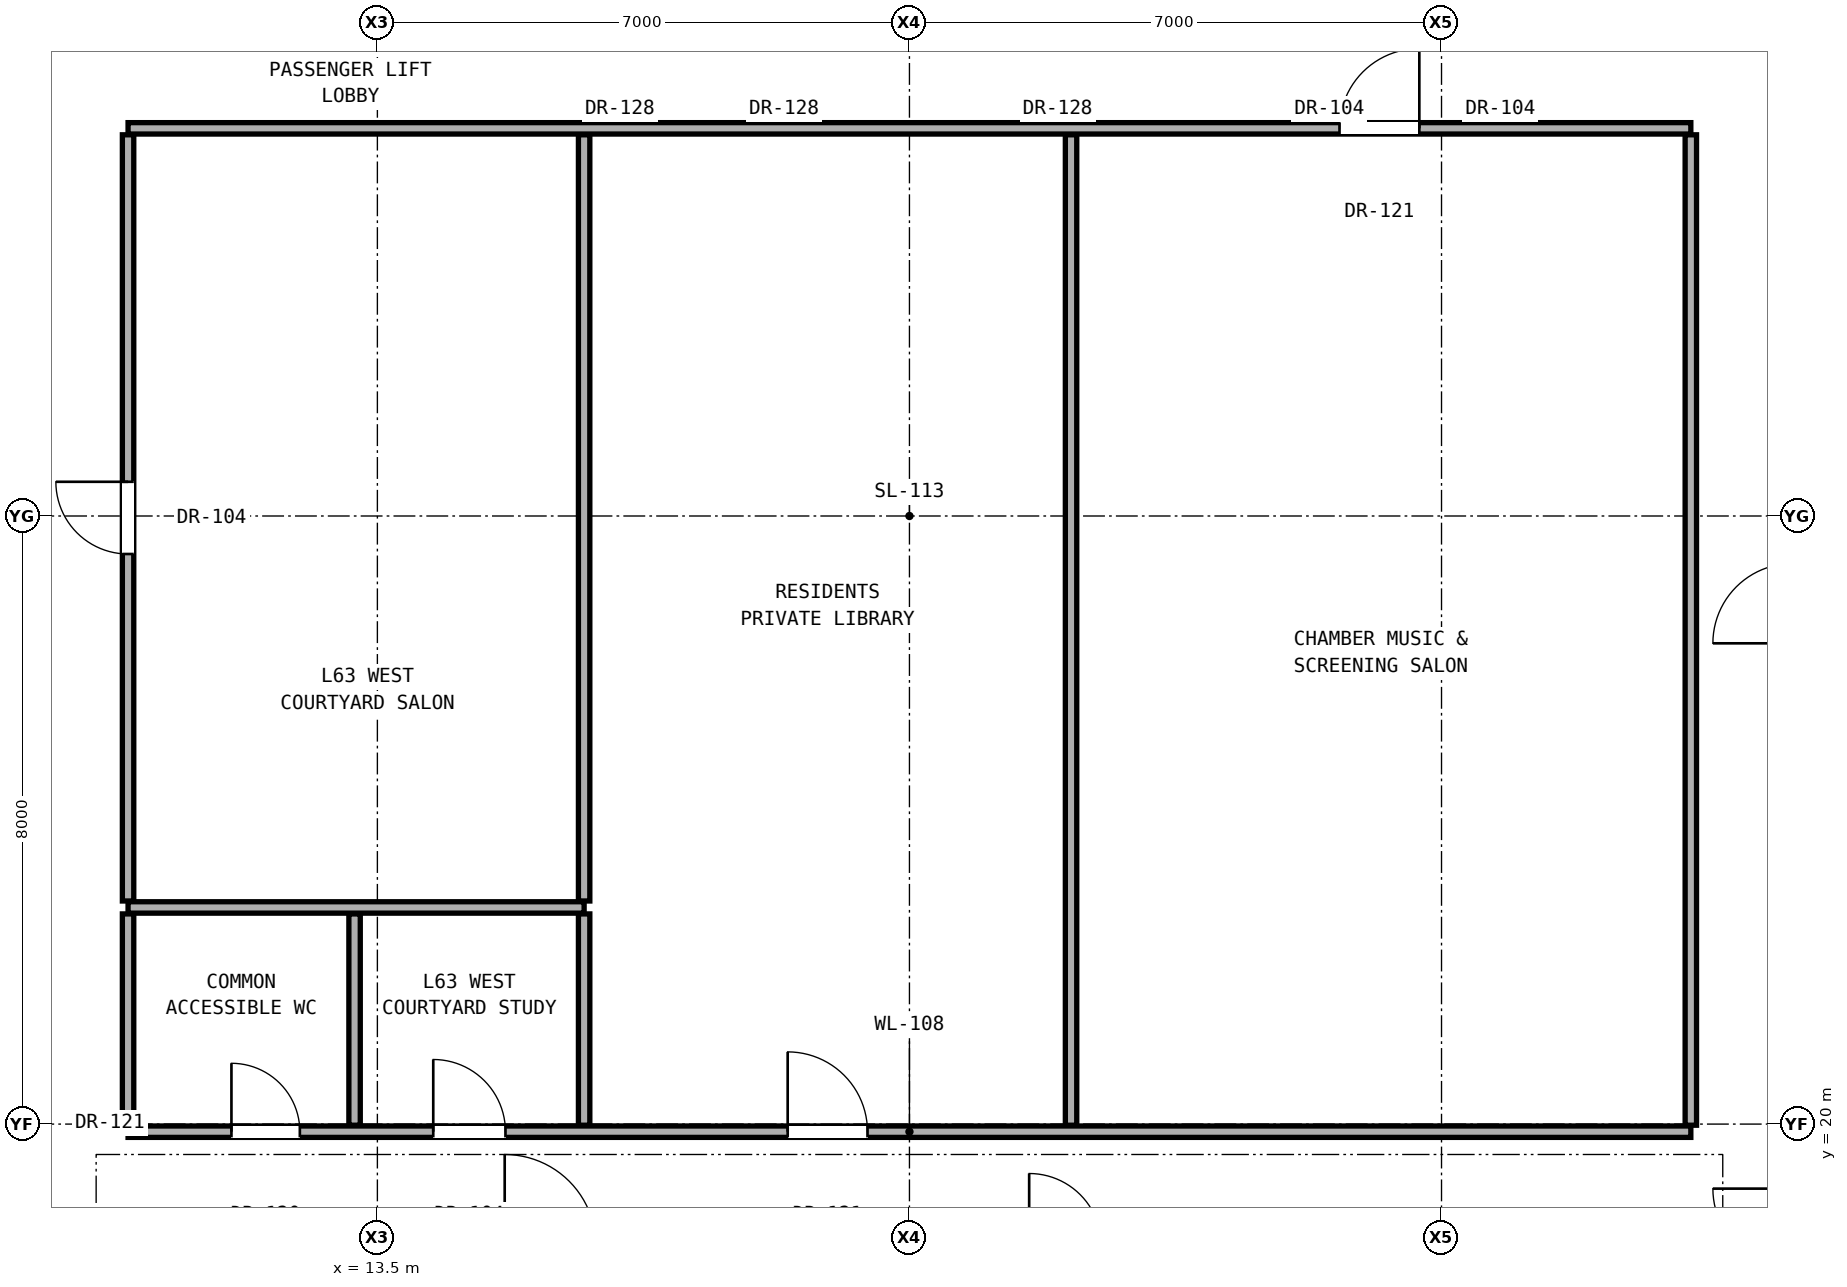
"""IFC4 building model, lengths in metres.
Left out: names, types, materials, properties, quantities, classifications, styles, units other than length and angle.
Written with IfcOpenShell. Run it as: python <this file> out.ifc"""

import sys

from ifc_helpers import new_model, si_unit, direction, frame, frame_2d, origin, place, context, subcontext, project, spatial, rectangle, extrude, element, fill, save


model = new_model("IFC4")
c1 = context("Model", 3, precision=1e-05, world=origin(), true_north=direction((0.0, 1.0)))
c2 = subcontext(c1, "Body", "Model", "MODEL_VIEW")
j1 = project(units=[si_unit("LENGTHUNIT", "METRE"), si_unit("PLANEANGLEUNIT", "RADIAN")], contexts=[c1])
p1 = place(None, origin())
s1 = spatial("IfcSite", under=j1, at=p1, CompositionType="ELEMENT")
p2 = place(p1, origin())
s2 = spatial("IfcBuilding", under=s1, at=p2, CompositionType="ELEMENT")
p3 = place(p2, frame((0.0, 0.0, 222.7)))
s3 = spatial("IfcBuildingStorey", under=s2, at=p3, CompositionType="ELEMENT", Elevation=222.7)
p4 = place(p3, frame((10.22, 19.9, 0.0), z_axis=(0.0, 0.0, 1.0), x_axis=(1.0, 0.0, 0.0)))
e1 = element("IfcWall", 1, at=p4, inside=s3, PredefinedType="PARTITIONING", context=c2, shape_type="SweptSolid", body=[
    extrude(rectangle(XDim=20.56, YDim=0.15, at=frame_2d((10.28, 0.0))), origin(), (0.0, 0.0, 1.0), 2.236),
])
p5 = place(p4, frame((1.36, 0.0, 0.0)))
e2 = element("IfcOpeningElement", 2, at=p5, cuts=e1, PredefinedType="OPENING", context=c2, shape_type="SweptSolid", body=[
    extrude(rectangle(XDim=0.9, YDim=2.1, at=frame_2d((0.45, 1.05))), frame((0.0, 0.085, 0.0), z_axis=(0.0, -1.0, 0.0), x_axis=(1.0, 0.0, 0.0)), (0.0, 0.0, 1.0), 0.17),
])
p6 = place(p4, frame((4.015, 0.0, 0.0)))
e3 = element("IfcOpeningElement", 3, at=p6, cuts=e1, PredefinedType="OPENING", context=c2, shape_type="SweptSolid", body=[
    extrude(rectangle(XDim=0.95, YDim=2.15, at=frame_2d((0.475, 1.075))), frame((0.0, 0.085, 0.0), z_axis=(0.0, -1.0, 0.0), x_axis=(1.0, 0.0, 0.0)), (0.0, 0.0, 1.0), 0.17),
])
p7 = place(p4, frame((8.678, 0.0, 0.0)))
e4 = element("IfcOpeningElement", 4, at=p7, cuts=e1, PredefinedType="OPENING", context=c2, shape_type="SweptSolid", body=[
    extrude(rectangle(XDim=1.05, YDim=2.2, at=frame_2d((0.525, 1.1))), frame((0.0, 0.085, 0.0), z_axis=(0.0, -1.0, 0.0), x_axis=(1.0, 0.0, 0.0)), (0.0, 0.0, 1.0), 0.17),
])
p8 = place(p3, frame((10.22, 22.85, 0.0), z_axis=(0.0, 0.0, 1.0), x_axis=(1.0, 0.0, 0.0)))
e5 = element("IfcWall", 5, at=p8, inside=s3, PredefinedType="PARTITIONING", context=c2, shape_type="SweptSolid", body=[
    extrude(rectangle(XDim=6.0, YDim=0.15, at=frame_2d((3.0, 0.0))), origin(), (0.0, 0.0, 1.0), 2.236),
])
p9 = place(p3, frame((10.22, 33.1, 0.0), z_axis=(0.0, 0.0, 1.0), x_axis=(1.0, 0.0, 0.0)))
e6 = element("IfcWall", 6, at=p9, inside=s3, PredefinedType="PARTITIONING", context=c2, shape_type="SweptSolid", body=[
    extrude(rectangle(XDim=20.56, YDim=0.15, at=frame_2d((10.28, 0.0))), origin(), (0.0, 0.0, 1.0), 2.236),
])
p10 = place(p9, frame((15.938, 0.0, 0.0)))
e7 = element("IfcOpeningElement", 7, at=p10, cuts=e6, PredefinedType="OPENING", context=c2, shape_type="SweptSolid", body=[
    extrude(rectangle(XDim=1.05, YDim=2.2, at=frame_2d((0.525, 1.1))), frame((0.0, 0.085, 0.0), z_axis=(0.0, -1.0, 0.0), x_axis=(1.0, 0.0, 0.0)), (0.0, 0.0, 1.0), 0.17),
])
p11 = place(p3, frame((10.22, 19.985, 0.0), z_axis=(0.0, 0.0, 1.0), x_axis=(0.0, 1.0, 0.0)))
e8 = element("IfcWall", 8, at=p11, inside=s3, PredefinedType="PARTITIONING", context=c2, shape_type="SweptSolid", body=[
    extrude(rectangle(XDim=2.78, YDim=0.15, at=frame_2d((1.39, 0.0))), origin(), (0.0, 0.0, 1.0), 3.1),
])
p12 = place(p3, frame((10.22, 22.935, 0.0), z_axis=(0.0, 0.0, 1.0), x_axis=(0.0, 1.0, 0.0)))
e9 = element("IfcWall", 9, at=p12, inside=s3, PredefinedType="PARTITIONING", context=c2, shape_type="SweptSolid", body=[
    extrude(rectangle(XDim=10.08, YDim=0.15, at=frame_2d((5.04, 0.0))), origin(), (0.0, 0.0, 1.0), 2.396),
])
p13 = place(p12, frame((4.565, 0.0, 0.0)))
e10 = element("IfcOpeningElement", 10, at=p13, cuts=e9, PredefinedType="OPENING", context=c2, shape_type="SweptSolid", body=[
    extrude(rectangle(XDim=0.95, YDim=2.15, at=frame_2d((0.475, 1.075))), frame((0.0, 0.085, 0.0), z_axis=(0.0, -1.0, 0.0), x_axis=(1.0, 0.0, 0.0)), (0.0, 0.0, 1.0), 0.17),
])
for number, where, z_axis, x_axis in (
    (11, (13.2, 19.985, 0.0), (0.0, 0.0, 1.0), (0.0, 1.0, 0.0)),
    (12, (16.22, 19.985, 0.0), (0.0, 0.0, 1.0), (0.0, 1.0, 0.0)),
):
    element("IfcWall", number, at=place(p3, frame(where, z_axis=z_axis, x_axis=x_axis)), inside=s3, PredefinedType="PARTITIONING", context=c2, shape_type="SweptSolid", body=[
        extrude(rectangle(XDim=2.78, YDim=0.15, at=frame_2d((1.39, 0.0))), origin(), (0.0, 0.0, 1.0), 3.1),
    ])
p14 = place(p3, frame((16.22, 22.935, 0.0), z_axis=(0.0, 0.0, 1.0), x_axis=(0.0, 1.0, 0.0)))
e13 = element("IfcWall", 13, at=p14, inside=s3, PredefinedType="PARTITIONING", context=c2, shape_type="SweptSolid", body=[
    extrude(rectangle(XDim=10.08, YDim=0.15, at=frame_2d((5.04, 0.0))), origin(), (0.0, 0.0, 1.0), 2.236),
])
p15 = place(p3, frame((22.626, 19.985, 0.0), z_axis=(0.0, 0.0, 1.0), x_axis=(0.0, 1.0, 0.0)))
e14 = element("IfcWall", 14, at=p15, inside=s3, PredefinedType="PARTITIONING", context=c2, shape_type="SweptSolid", body=[
    extrude(rectangle(XDim=13.03, YDim=0.15, at=frame_2d((6.515, 0.0))), origin(), (0.0, 0.0, 1.0), 2.236),
])
p16 = place(p3, frame((30.78, 19.985, 0.0), z_axis=(0.0, 0.0, 1.0), x_axis=(0.0, 1.0, 0.0)))
e15 = element("IfcWall", 15, at=p16, inside=s3, PredefinedType="PARTITIONING", context=c2, shape_type="SweptSolid", body=[
    extrude(rectangle(XDim=13.03, YDim=0.15, at=frame_2d((6.515, 0.0))), origin(), (0.0, 0.0, 1.0), 2.396),
])
p17 = place(p5, origin())
e16 = element("IfcDoor", 16, at=p17, inside=s3, OperationType="SINGLE_SWING_LEFT", PredefinedType="DOOR", context=c2, shape_type="SweptSolid", body=[
    extrude(rectangle(XDim=0.9, YDim=2.1, at=frame_2d((0.45, 1.05))), frame((0.0, 0.025, 0.0), z_axis=(0.0, -1.0, 0.0), x_axis=(1.0, 0.0, 0.0)), (0.0, 0.0, 1.0), 0.05),
])
fill(e2, e16)
p18 = place(p6, origin())
e17 = element("IfcDoor", 17, at=p18, inside=s3, OperationType="SINGLE_SWING_LEFT", PredefinedType="DOOR", context=c2, shape_type="SweptSolid", body=[
    extrude(rectangle(XDim=0.95, YDim=2.15, at=frame_2d((0.475, 1.075))), frame((0.0, 0.025, 0.0), z_axis=(0.0, -1.0, 0.0), x_axis=(1.0, 0.0, 0.0)), (0.0, 0.0, 1.0), 0.05),
])
fill(e3, e17)
p19 = place(p13, origin())
e18 = element("IfcDoor", 18, at=p19, inside=s3, OperationType="SINGLE_SWING_RIGHT", PredefinedType="DOOR", context=c2, shape_type="SweptSolid", body=[
    extrude(rectangle(XDim=0.95, YDim=2.15, at=frame_2d((0.475, 1.075))), frame((0.0, 0.025, 0.0), z_axis=(0.0, -1.0, 0.0), x_axis=(1.0, 0.0, 0.0)), (0.0, 0.0, 1.0), 0.05),
])
fill(e10, e18)
p20 = place(p7, origin())
e19 = element("IfcDoor", 19, at=p20, inside=s3, OperationType="SINGLE_SWING_LEFT", PredefinedType="DOOR", context=c2, shape_type="SweptSolid", body=[
    extrude(rectangle(XDim=1.05, YDim=2.2, at=frame_2d((0.525, 1.1))), frame((0.0, 0.025, 0.0), z_axis=(0.0, -1.0, 0.0), x_axis=(1.0, 0.0, 0.0)), (0.0, 0.0, 1.0), 0.05),
])
fill(e4, e19)
p21 = place(p10, origin())
e20 = element("IfcDoor", 20, at=p21, inside=s3, OperationType="SINGLE_SWING_RIGHT", PredefinedType="DOOR", context=c2, shape_type="SweptSolid", body=[
    extrude(rectangle(XDim=1.05, YDim=2.2, at=frame_2d((0.525, 1.1))), frame((0.0, 0.025, 0.0), z_axis=(0.0, -1.0, 0.0), x_axis=(1.0, 0.0, 0.0)), (0.0, 0.0, 1.0), 0.05),
])
fill(e7, e20)
save(model, sys.argv[1])
